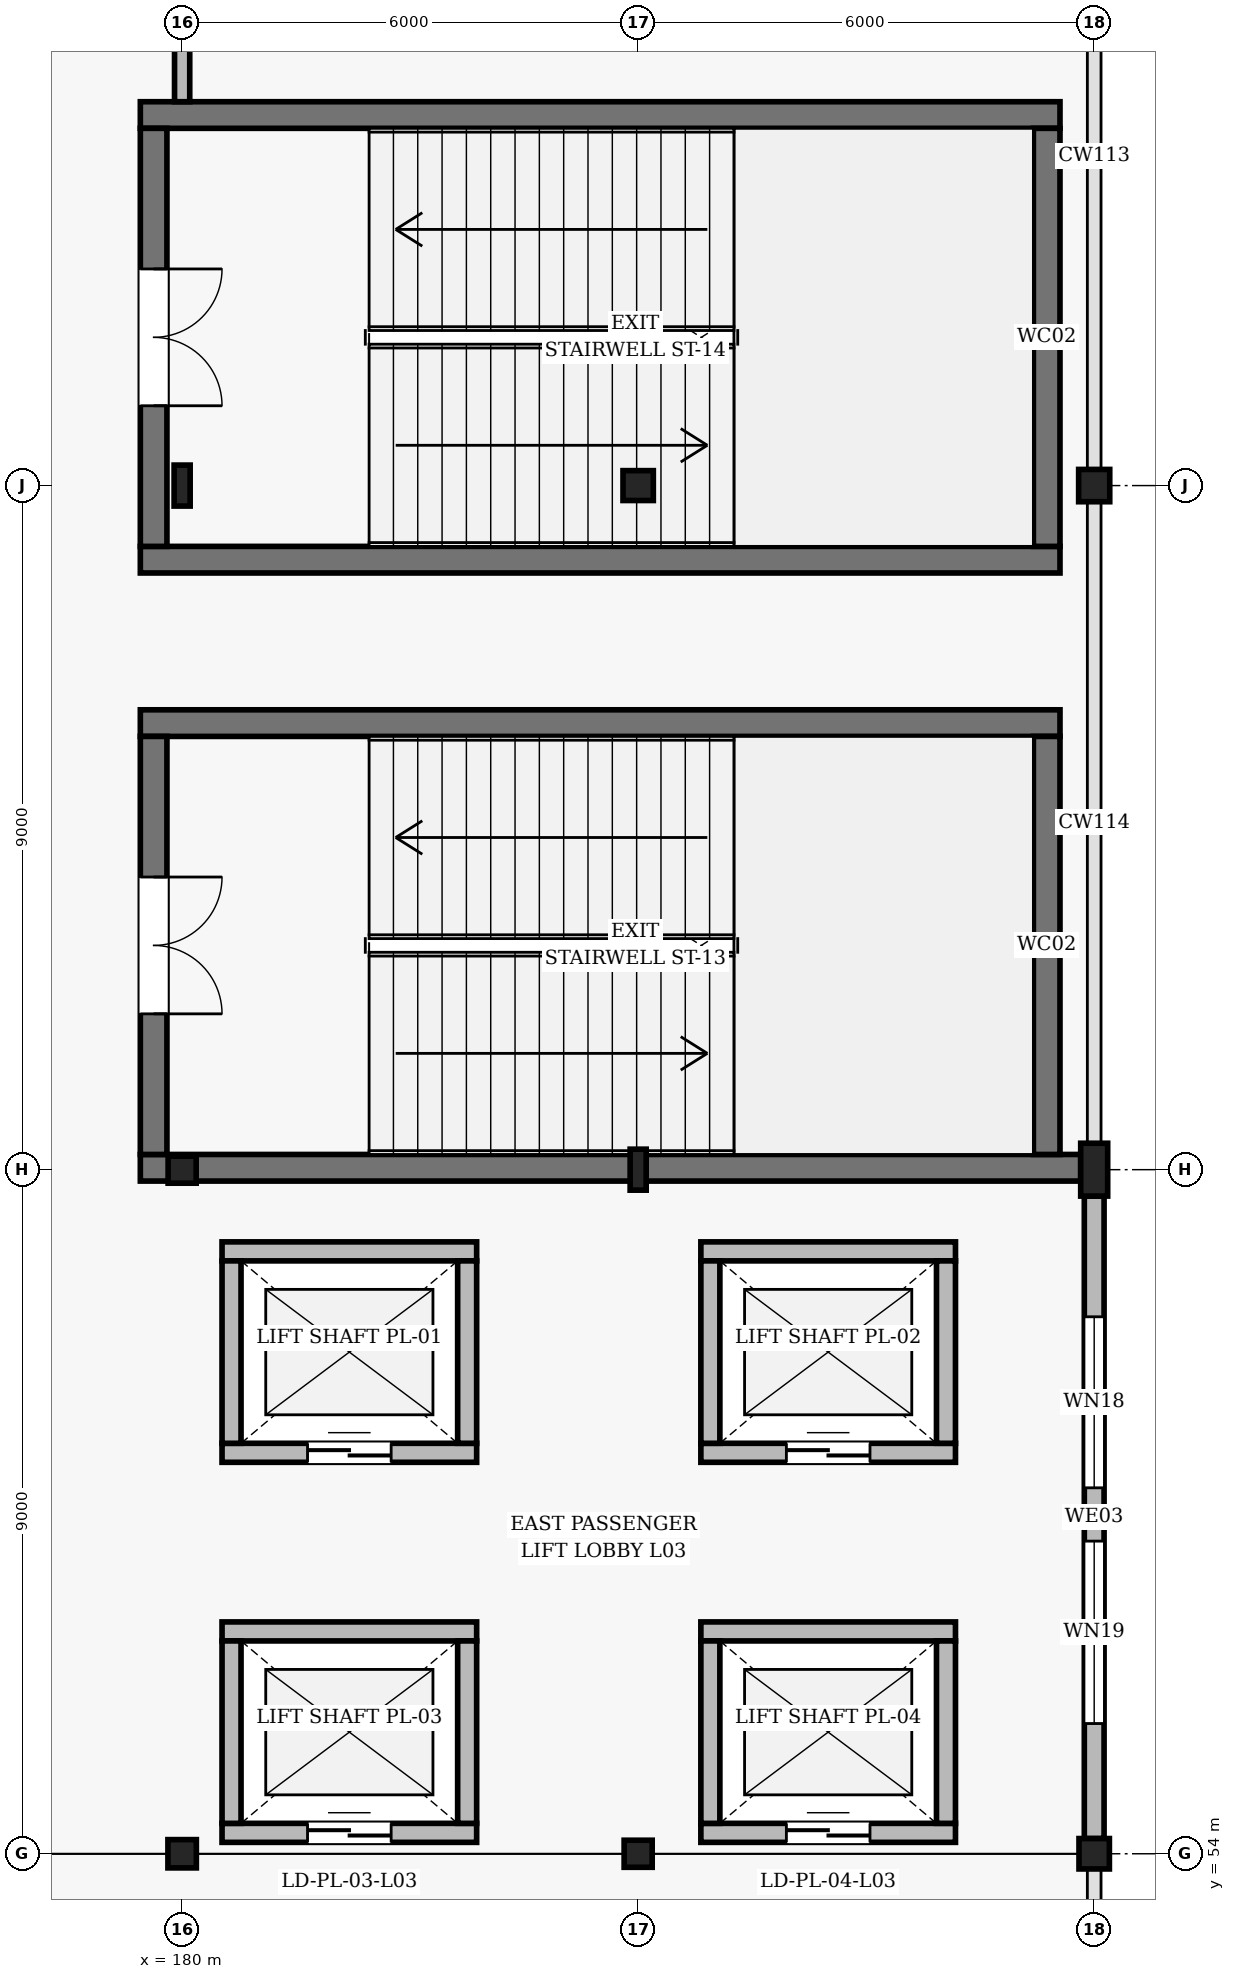
"""IFC4 building model, lengths in metres.
Left out: names, types, materials, properties, quantities, classifications, styles, units other than length and angle.
Written with IfcOpenShell. Run it as: python <this file> out.ifc"""

import sys

from ifc_helpers import new_model, si_unit, direction, frame, frame_2d, origin, origin_2d, place, context, subcontext, project, spatial, rectangle, hollow_rectangle, i_section, extrude, element, fill, save


model = new_model("IFC4")
c1 = context("Model", 3, precision=1e-05, world=origin(), true_north=direction((0.0, 1.0)))
c2 = subcontext(c1, "Body", "Model", "MODEL_VIEW")
j1 = project(units=[si_unit("LENGTHUNIT", "METRE"), si_unit("PLANEANGLEUNIT", "RADIAN")], contexts=[c1])
p1 = place(None, origin())
s1 = spatial("IfcSite", under=j1, at=p1, CompositionType="ELEMENT")
p2 = place(p1, origin())
s2 = spatial("IfcBuilding", under=s1, at=p2, CompositionType="ELEMENT")
p3 = place(p2, frame((0.0, 0.0, 15.6)))
s3 = spatial("IfcBuildingStorey", under=s2, at=p3, CompositionType="ELEMENT", Elevation=15.6)
p4 = place(p3, frame((180.0, 54.0, 0.0), z_axis=(0.0, 0.0, 1.0), x_axis=(1.0, 0.0, 0.0)))
e1 = element("IfcColumn", 1, at=p4, inside=s3, PredefinedType="COLUMN", context=c2, shape_type="SweptSolid", body=[
    extrude(i_section(OverallWidth=0.374, OverallDepth=0.372, WebThickness=0.016, FlangeThickness=0.026, FilletRadius=0.016, at=origin_2d()), origin(), (0.0, 0.0, 1.0), 4.8),
])
p5 = place(p3, frame((180.0, 63.0, 0.0), z_axis=(0.0, 0.0, 1.0), x_axis=(1.0, 0.0, 0.0)))
e2 = element("IfcColumn", 2, at=p5, inside=s3, PredefinedType="COLUMN", context=c2, shape_type="SweptSolid", body=[
    extrude(i_section(OverallWidth=0.369, OverallDepth=0.356, WebThickness=0.011, FlangeThickness=0.018, FilletRadius=0.015, at=origin_2d()), origin(), (0.0, 0.0, 1.0), 4.8),
])
p6 = place(p3, frame((180.0, 72.0, 0.0), z_axis=(0.0, 0.0, 1.0), x_axis=(1.0, 0.0, 0.0)))
e3 = element("IfcColumn", 3, at=p6, inside=s3, PredefinedType="COLUMN", context=c2, shape_type="SweptSolid", body=[
    extrude(i_section(OverallWidth=0.211, OverallDepth=0.539, WebThickness=0.012, FlangeThickness=0.019, FilletRadius=0.014, at=origin_2d()), origin(), (0.0, 0.0, 1.0), 4.8),
])
p7 = place(p3, frame((186.0, 54.0, 0.0), z_axis=(0.0, 0.0, 1.0), x_axis=(1.0, 0.0, 0.0)))
e4 = element("IfcColumn", 4, at=p7, inside=s3, PredefinedType="COLUMN", context=c2, shape_type="SweptSolid", body=[
    extrude(i_section(OverallWidth=0.369, OverallDepth=0.356, WebThickness=0.011, FlangeThickness=0.018, FilletRadius=0.015, at=origin_2d()), origin(), (0.0, 0.0, 1.0), 4.8),
])
p8 = place(p3, frame((186.0, 63.0, 0.0), z_axis=(0.0, 0.0, 1.0), x_axis=(1.0, 0.0, 0.0)))
e5 = element("IfcColumn", 5, at=p8, inside=s3, PredefinedType="COLUMN", context=c2, shape_type="SweptSolid", body=[
    extrude(i_section(OverallWidth=0.211, OverallDepth=0.539, WebThickness=0.012, FlangeThickness=0.019, FilletRadius=0.014, at=origin_2d()), origin(), (0.0, 0.0, 1.0), 4.8),
])
p9 = place(p3, frame((186.0, 72.0, 0.0), z_axis=(0.0, 0.0, 1.0), x_axis=(1.0, 0.0, 0.0)))
e6 = element("IfcColumn", 6, at=p9, inside=s3, PredefinedType="COLUMN", context=c2, shape_type="SweptSolid", body=[
    extrude(i_section(OverallWidth=0.399, OverallDepth=0.393, WebThickness=0.023, FlangeThickness=0.037, FilletRadius=0.018, at=origin_2d()), origin(), (0.0, 0.0, 1.0), 4.8),
])
p10 = place(p3, frame((192.0, 54.0, 0.0), z_axis=(0.0, 0.0, 1.0), x_axis=(1.0, 0.0, 0.0)))
e7 = element("IfcColumn", 7, at=p10, inside=s3, PredefinedType="COLUMN", context=c2, shape_type="SweptSolid", body=[
    extrude(hollow_rectangle(XDim=0.4, YDim=0.4, WallThickness=0.016, InnerFilletRadius=0.016, OuterFilletRadius=0.032, at=origin_2d()), origin(), (0.0, 0.0, 1.0), 4.8),
])
p11 = place(p3, frame((192.0, 63.0, 0.0), z_axis=(0.0, 0.0, 1.0), x_axis=(1.0, 0.0, 0.0)))
e8 = element("IfcColumn", 8, at=p11, inside=s3, PredefinedType="COLUMN", context=c2, shape_type="SweptSolid", body=[
    extrude(i_section(OverallWidth=0.355, OverallDepth=0.695, WebThickness=0.015, FlangeThickness=0.025, FilletRadius=0.018, at=origin_2d()), origin(), (0.0, 0.0, 1.0), 4.8),
])
p12 = place(p3, frame((192.0, 72.0, 0.0), z_axis=(0.0, 0.0, 1.0), x_axis=(1.0, 0.0, 0.0)))
e9 = element("IfcColumn", 9, at=p12, inside=s3, PredefinedType="COLUMN", context=c2, shape_type="SweptSolid", body=[
    extrude(i_section(OverallWidth=0.409, OverallDepth=0.425, WebThickness=0.031, FlangeThickness=0.049, FilletRadius=0.02, at=origin_2d()), origin(), (0.0, 0.0, 1.0), 4.8),
])
p13 = place(p3, frame((192.0, 62.653, 0.0), z_axis=(0.0, 0.0, 1.0), x_axis=(0.0, -1.0, 0.0)))
e10 = element("IfcWall", 10, at=p13, inside=s3, PredefinedType="SOLIDWALL", context=c2, shape_type="SweptSolid", body=[
    extrude(rectangle(XDim=8.453, YDim=0.26, at=frame_2d((4.226, 0.0))), origin(), (0.0, 0.0, 1.0), 4.046),
])
p14 = place(p13, frame((1.588, 0.0, 0.95)))
e11 = element("IfcOpeningElement", 11, at=p14, cuts=e10, PredefinedType="OPENING", context=c2, shape_type="SweptSolid", body=[
    extrude(rectangle(XDim=2.25, YDim=2.15, at=frame_2d((1.125, 1.075))), frame((0.0, 0.14, 0.0), z_axis=(0.0, -1.0, 0.0), x_axis=(1.0, 0.0, 0.0)), (0.0, 0.0, 1.0), 0.28),
])
p15 = place(p13, frame((4.539, 0.0, 0.95)))
e12 = element("IfcOpeningElement", 12, at=p15, cuts=e10, PredefinedType="OPENING", context=c2, shape_type="SweptSolid", body=[
    extrude(rectangle(XDim=2.4, YDim=2.2, at=frame_2d((1.2, 1.1))), frame((0.0, 0.14, 0.0), z_axis=(0.0, -1.0, 0.0), x_axis=(1.0, 0.0, 0.0)), (0.0, 0.0, 1.0), 0.28),
])
p16 = place(p3, frame((179.45, 63.025, 0.0), z_axis=(0.0, 0.0, 1.0), x_axis=(1.0, 0.0, 0.0)))
e13 = element("IfcWall", 13, at=p16, inside=s3, PredefinedType="SHEAR", context=c2, shape_type="SweptSolid", body=[
    extrude(rectangle(XDim=12.373, YDim=0.35, at=frame_2d((6.186, 0.0))), origin(), (0.0, 0.0, 1.0), 4.6),
])
p17 = place(p3, frame((191.55, 68.875, 0.0), z_axis=(0.0, 0.0, 1.0), x_axis=(-1.0, 0.0, 0.0)))
e14 = element("IfcWall", 14, at=p17, inside=s3, PredefinedType="SHEAR", context=c2, shape_type="SweptSolid", body=[
    extrude(rectangle(XDim=12.1, YDim=0.35, at=frame_2d((6.05, 0.0))), origin(), (0.0, 0.0, 1.0), 4.6),
])
p18 = place(p3, frame((179.625, 68.7, 0.0), z_axis=(0.0, 0.0, 1.0), x_axis=(0.0, -1.0, 0.0)))
e15 = element("IfcWall", 15, at=p18, inside=s3, PredefinedType="SHEAR", context=c2, shape_type="SweptSolid", body=[
    extrude(rectangle(XDim=5.5, YDim=0.35, at=frame_2d((2.75, 0.0))), origin(), (0.0, 0.0, 1.0), 4.6),
])
p19 = place(p18, frame((1.85, 0.0, 0.0)))
e16 = element("IfcOpeningElement", 16, at=p19, cuts=e15, PredefinedType="OPENING", context=c2, shape_type="SweptSolid", body=[
    extrude(rectangle(XDim=1.8, YDim=2.2, at=frame_2d((0.9, 1.1))), frame((0.0, 0.185, 0.0), z_axis=(0.0, -1.0, 0.0), x_axis=(1.0, 0.0, 0.0)), (0.0, 0.0, 1.0), 0.37),
])
p20 = place(p3, frame((191.375, 63.2, 0.0), z_axis=(0.0, 0.0, 1.0), x_axis=(0.0, 1.0, 0.0)))
e17 = element("IfcWall", 17, at=p20, inside=s3, PredefinedType="SHEAR", context=c2, shape_type="SweptSolid", body=[
    extrude(rectangle(XDim=5.5, YDim=0.35, at=frame_2d((2.75, 0.0))), origin(), (0.0, 0.0, 1.0), 4.6),
])
for number, where, z_axis, x_axis in (
    (18, (179.45, 71.025, 0.0), (0.0, 0.0, 1.0), (1.0, 0.0, 0.0)),
    (19, (191.55, 76.875, 0.0), (0.0, 0.0, 1.0), (-1.0, 0.0, 0.0)),
):
    element("IfcWall", number, at=place(p3, frame(where, z_axis=z_axis, x_axis=x_axis)), inside=s3, PredefinedType="SHEAR", context=c2, shape_type="SweptSolid", body=[
        extrude(rectangle(XDim=12.1, YDim=0.35, at=frame_2d((6.05, 0.0))), origin(), (0.0, 0.0, 1.0), 4.6),
    ])
p21 = place(p3, frame((179.625, 76.7, 0.0), z_axis=(0.0, 0.0, 1.0), x_axis=(0.0, -1.0, 0.0)))
e20 = element("IfcWall", 20, at=p21, inside=s3, PredefinedType="SHEAR", context=c2, shape_type="SweptSolid", body=[
    extrude(rectangle(XDim=5.5, YDim=0.35, at=frame_2d((2.75, 0.0))), origin(), (0.0, 0.0, 1.0), 4.6),
])
p22 = place(p21, frame((1.85, 0.0, 0.0)))
e21 = element("IfcOpeningElement", 21, at=p22, cuts=e20, PredefinedType="OPENING", context=c2, shape_type="SweptSolid", body=[
    extrude(rectangle(XDim=1.8, YDim=2.2, at=frame_2d((0.9, 1.1))), frame((0.0, 0.185, 0.0), z_axis=(0.0, -1.0, 0.0), x_axis=(1.0, 0.0, 0.0)), (0.0, 0.0, 1.0), 0.37),
])
p23 = place(p3, frame((191.375, 71.2, 0.0), z_axis=(0.0, 0.0, 1.0), x_axis=(0.0, 1.0, 0.0)))
e22 = element("IfcWall", 22, at=p23, inside=s3, PredefinedType="SHEAR", context=c2, shape_type="SweptSolid", body=[
    extrude(rectangle(XDim=5.5, YDim=0.35, at=frame_2d((2.75, 0.0))), origin(), (0.0, 0.0, 1.0), 4.6),
])
p24 = place(p3, frame((180.525, 59.275, 0.0), z_axis=(0.0, 0.0, 1.0), x_axis=(1.0, 0.0, 0.0)))
e23 = element("IfcWall", 23, at=p24, inside=s3, PredefinedType="SOLIDWALL", context=c2, shape_type="SweptSolid", body=[
    extrude(rectangle(XDim=3.35, YDim=0.25, at=frame_2d((1.675, 0.0))), origin(), (0.0, 0.0, 1.0), 4.6),
])
p25 = place(p24, frame((1.125, 0.0, 0.0)))
e24 = element("IfcOpeningElement", 24, at=p25, cuts=e23, PredefinedType="OPENING", context=c2, shape_type="SweptSolid", body=[
    extrude(rectangle(XDim=1.1, YDim=2.2, at=frame_2d((0.55, 1.1))), frame((0.0, 0.135, 0.0), z_axis=(0.0, -1.0, 0.0), x_axis=(1.0, 0.0, 0.0)), (0.0, 0.0, 1.0), 0.27),
])
p26 = place(p3, frame((183.875, 61.925, 0.0), z_axis=(0.0, 0.0, 1.0), x_axis=(-1.0, 0.0, 0.0)))
e25 = element("IfcWall", 25, at=p26, inside=s3, PredefinedType="SOLIDWALL", context=c2, shape_type="SweptSolid", body=[
    extrude(rectangle(XDim=3.35, YDim=0.25, at=frame_2d((1.675, 0.0))), origin(), (0.0, 0.0, 1.0), 4.6),
])
for number, where, z_axis, x_axis in (
    (26, (180.65, 61.8, 0.0), (0.0, 0.0, 1.0), (0.0, -1.0, 0.0)),
    (27, (183.75, 59.4, 0.0), (0.0, 0.0, 1.0), (0.0, 1.0, 0.0)),
):
    element("IfcWall", number, at=place(p3, frame(where, z_axis=z_axis, x_axis=x_axis)), inside=s3, PredefinedType="SOLIDWALL", context=c2, shape_type="SweptSolid", body=[
        extrude(rectangle(XDim=2.4, YDim=0.25, at=frame_2d((1.2, 0.0))), origin(), (0.0, 0.0, 1.0), 4.6),
    ])
p27 = place(p3, frame((186.825, 59.275, 0.0), z_axis=(0.0, 0.0, 1.0), x_axis=(1.0, 0.0, 0.0)))
e28 = element("IfcWall", 28, at=p27, inside=s3, PredefinedType="SOLIDWALL", context=c2, shape_type="SweptSolid", body=[
    extrude(rectangle(XDim=3.35, YDim=0.25, at=frame_2d((1.675, 0.0))), origin(), (0.0, 0.0, 1.0), 4.6),
])
p28 = place(p27, frame((1.125, 0.0, 0.0)))
e29 = element("IfcOpeningElement", 29, at=p28, cuts=e28, PredefinedType="OPENING", context=c2, shape_type="SweptSolid", body=[
    extrude(rectangle(XDim=1.1, YDim=2.2, at=frame_2d((0.55, 1.1))), frame((0.0, 0.135, 0.0), z_axis=(0.0, -1.0, 0.0), x_axis=(1.0, 0.0, 0.0)), (0.0, 0.0, 1.0), 0.27),
])
p29 = place(p3, frame((190.175, 61.925, 0.0), z_axis=(0.0, 0.0, 1.0), x_axis=(-1.0, 0.0, 0.0)))
e30 = element("IfcWall", 30, at=p29, inside=s3, PredefinedType="SOLIDWALL", context=c2, shape_type="SweptSolid", body=[
    extrude(rectangle(XDim=3.35, YDim=0.25, at=frame_2d((1.675, 0.0))), origin(), (0.0, 0.0, 1.0), 4.6),
])
for number, where, z_axis, x_axis in (
    (31, (186.95, 61.8, 0.0), (0.0, 0.0, 1.0), (0.0, -1.0, 0.0)),
    (32, (190.05, 59.4, 0.0), (0.0, 0.0, 1.0), (0.0, 1.0, 0.0)),
):
    element("IfcWall", number, at=place(p3, frame(where, z_axis=z_axis, x_axis=x_axis)), inside=s3, PredefinedType="SOLIDWALL", context=c2, shape_type="SweptSolid", body=[
        extrude(rectangle(XDim=2.4, YDim=0.25, at=frame_2d((1.2, 0.0))), origin(), (0.0, 0.0, 1.0), 4.6),
    ])
p30 = place(p3, frame((180.525, 54.275, 0.0), z_axis=(0.0, 0.0, 1.0), x_axis=(1.0, 0.0, 0.0)))
e33 = element("IfcWall", 33, at=p30, inside=s3, PredefinedType="SOLIDWALL", context=c2, shape_type="SweptSolid", body=[
    extrude(rectangle(XDim=3.35, YDim=0.25, at=frame_2d((1.675, 0.0))), origin(), (0.0, 0.0, 1.0), 3.901),
])
p31 = place(p30, frame((1.125, 0.0, 0.0)))
e34 = element("IfcOpeningElement", 34, at=p31, cuts=e33, PredefinedType="OPENING", context=c2, shape_type="SweptSolid", body=[
    extrude(rectangle(XDim=1.1, YDim=2.2, at=frame_2d((0.55, 1.1))), frame((0.0, 0.135, 0.0), z_axis=(0.0, -1.0, 0.0), x_axis=(1.0, 0.0, 0.0)), (0.0, 0.0, 1.0), 0.27),
])
p32 = place(p3, frame((183.875, 56.925, 0.0), z_axis=(0.0, 0.0, 1.0), x_axis=(-1.0, 0.0, 0.0)))
e35 = element("IfcWall", 35, at=p32, inside=s3, PredefinedType="SOLIDWALL", context=c2, shape_type="SweptSolid", body=[
    extrude(rectangle(XDim=3.35, YDim=0.25, at=frame_2d((1.675, 0.0))), origin(), (0.0, 0.0, 1.0), 4.178),
])
for number, where, z_axis, x_axis in (
    (36, (180.65, 56.8, 0.0), (0.0, 0.0, 1.0), (0.0, -1.0, 0.0)),
    (37, (183.75, 54.4, 0.0), (0.0, 0.0, 1.0), (0.0, 1.0, 0.0)),
):
    element("IfcWall", number, at=place(p3, frame(where, z_axis=z_axis, x_axis=x_axis)), inside=s3, PredefinedType="SOLIDWALL", context=c2, shape_type="SweptSolid", body=[
        extrude(rectangle(XDim=2.4, YDim=0.25, at=frame_2d((1.2, 0.0))), origin(), (0.0, 0.0, 1.0), 3.901),
    ])
p33 = place(p3, frame((186.825, 54.275, 0.0), z_axis=(0.0, 0.0, 1.0), x_axis=(1.0, 0.0, 0.0)))
e38 = element("IfcWall", 38, at=p33, inside=s3, PredefinedType="SOLIDWALL", context=c2, shape_type="SweptSolid", body=[
    extrude(rectangle(XDim=3.35, YDim=0.25, at=frame_2d((1.675, 0.0))), origin(), (0.0, 0.0, 1.0), 3.974),
])
p34 = place(p33, frame((1.125, 0.0, 0.0)))
e39 = element("IfcOpeningElement", 39, at=p34, cuts=e38, PredefinedType="OPENING", context=c2, shape_type="SweptSolid", body=[
    extrude(rectangle(XDim=1.1, YDim=2.2, at=frame_2d((0.55, 1.1))), frame((0.0, 0.135, 0.0), z_axis=(0.0, -1.0, 0.0), x_axis=(1.0, 0.0, 0.0)), (0.0, 0.0, 1.0), 0.27),
])
p35 = place(p3, frame((190.175, 56.925, 0.0), z_axis=(0.0, 0.0, 1.0), x_axis=(-1.0, 0.0, 0.0)))
e40 = element("IfcWall", 40, at=p35, inside=s3, PredefinedType="SOLIDWALL", context=c2, shape_type="SweptSolid", body=[
    extrude(rectangle(XDim=3.35, YDim=0.25, at=frame_2d((1.675, 0.0))), origin(), (0.0, 0.0, 1.0), 4.277),
])
for number, where, z_axis, x_axis in (
    (41, (186.95, 56.8, 0.0), (0.0, 0.0, 1.0), (0.0, -1.0, 0.0)),
    (42, (190.05, 54.4, 0.0), (0.0, 0.0, 1.0), (0.0, 1.0, 0.0)),
):
    element("IfcWall", number, at=place(p3, frame(where, z_axis=z_axis, x_axis=x_axis)), inside=s3, PredefinedType="SOLIDWALL", context=c2, shape_type="SweptSolid", body=[
        extrude(rectangle(XDim=2.4, YDim=0.25, at=frame_2d((1.2, 0.0))), origin(), (0.0, 0.0, 1.0), 3.974),
    ])
p36 = place(p3, frame((180.0, 77.05, 0.0), z_axis=(0.0, 0.0, 1.0), x_axis=(0.0, 1.0, 0.0)))
e43 = element("IfcWall", 43, at=p36, inside=s3, PredefinedType="PARTITIONING", context=c2, shape_type="SweptSolid", body=[
    extrude(rectangle(XDim=3.74, YDim=0.2, at=frame_2d((1.87, 0.0))), origin(), (0.0, 0.0, 1.0), 3.901),
])
p37 = place(p36, frame((1.145, 0.0, 0.0)))
e44 = element("IfcOpeningElement", 44, at=p37, cuts=e43, PredefinedType="OPENING", context=c2, shape_type="SweptSolid", body=[
    extrude(rectangle(XDim=1.45, YDim=2.3, at=frame_2d((0.725, 1.15))), frame((0.0, 0.11, 0.0), z_axis=(0.0, -1.0, 0.0), x_axis=(1.0, 0.0, 0.0)), (0.0, 0.0, 1.0), 0.22),
])
p38 = place(p14, origin())
e45 = element("IfcWindow", 45, at=p38, inside=s3, PartitioningType="SINGLE_PANEL", PredefinedType="WINDOW", context=c2, shape_type="SweptSolid", body=[
    extrude(rectangle(XDim=2.25, YDim=2.15, at=frame_2d((1.125, 1.075))), frame((0.0, 0.03, 0.0), z_axis=(0.0, -1.0, 0.0), x_axis=(1.0, 0.0, 0.0)), (0.0, 0.0, 1.0), 0.06),
])
fill(e11, e45)
p39 = place(p15, origin())
e46 = element("IfcWindow", 46, at=p39, inside=s3, PartitioningType="SINGLE_PANEL", PredefinedType="WINDOW", context=c2, shape_type="SweptSolid", body=[
    extrude(rectangle(XDim=2.4, YDim=2.2, at=frame_2d((1.2, 1.1))), frame((0.0, 0.03, 0.0), z_axis=(0.0, -1.0, 0.0), x_axis=(1.0, 0.0, 0.0)), (0.0, 0.0, 1.0), 0.06),
])
fill(e12, e46)
p40 = place(p19, origin())
e47 = element("IfcDoor", 47, at=p40, inside=s3, OperationType="DOUBLE_DOOR_SINGLE_SWING", PredefinedType="DOOR", context=c2, shape_type="SweptSolid", body=[
    extrude(rectangle(XDim=1.8, YDim=2.2, at=frame_2d((0.9, 1.1))), frame((0.0, 0.025, 0.0), z_axis=(0.0, -1.0, 0.0), x_axis=(1.0, 0.0, 0.0)), (0.0, 0.0, 1.0), 0.05),
])
fill(e16, e47)
p41 = place(p22, origin())
e48 = element("IfcDoor", 48, at=p41, inside=s3, OperationType="DOUBLE_DOOR_SINGLE_SWING", PredefinedType="DOOR", context=c2, shape_type="SweptSolid", body=[
    extrude(rectangle(XDim=1.8, YDim=2.2, at=frame_2d((0.9, 1.1))), frame((0.0, 0.025, 0.0), z_axis=(0.0, -1.0, 0.0), x_axis=(1.0, 0.0, 0.0)), (0.0, 0.0, 1.0), 0.05),
])
fill(e21, e48)
p42 = place(p25, origin())
e49 = element("IfcDoor", 49, at=p42, inside=s3, OperationType="DOUBLE_DOOR_SLIDING", PredefinedType="DOOR", context=c2, shape_type="SweptSolid", body=[
    extrude(rectangle(XDim=1.1, YDim=2.2, at=frame_2d((0.55, 1.1))), frame((0.0, 0.025, 0.0), z_axis=(0.0, -1.0, 0.0), x_axis=(1.0, 0.0, 0.0)), (0.0, 0.0, 1.0), 0.05),
])
fill(e24, e49)
p43 = place(p28, origin())
e50 = element("IfcDoor", 50, at=p43, inside=s3, OperationType="DOUBLE_DOOR_SLIDING", PredefinedType="DOOR", context=c2, shape_type="SweptSolid", body=[
    extrude(rectangle(XDim=1.1, YDim=2.2, at=frame_2d((0.55, 1.1))), frame((0.0, 0.025, 0.0), z_axis=(0.0, -1.0, 0.0), x_axis=(1.0, 0.0, 0.0)), (0.0, 0.0, 1.0), 0.05),
])
fill(e29, e50)
p44 = place(p31, origin())
e51 = element("IfcDoor", 51, at=p44, inside=s3, OperationType="DOUBLE_DOOR_SLIDING", PredefinedType="DOOR", context=c2, shape_type="SweptSolid", body=[
    extrude(rectangle(XDim=1.1, YDim=2.2, at=frame_2d((0.55, 1.1))), frame((0.0, 0.025, 0.0), z_axis=(0.0, -1.0, 0.0), x_axis=(1.0, 0.0, 0.0)), (0.0, 0.0, 1.0), 0.05),
])
fill(e34, e51)
p45 = place(p34, origin())
e52 = element("IfcDoor", 52, at=p45, inside=s3, OperationType="DOUBLE_DOOR_SLIDING", PredefinedType="DOOR", context=c2, shape_type="SweptSolid", body=[
    extrude(rectangle(XDim=1.1, YDim=2.2, at=frame_2d((0.55, 1.1))), frame((0.0, 0.025, 0.0), z_axis=(0.0, -1.0, 0.0), x_axis=(1.0, 0.0, 0.0)), (0.0, 0.0, 1.0), 0.05),
])
fill(e39, e52)
save(model, sys.argv[1])
